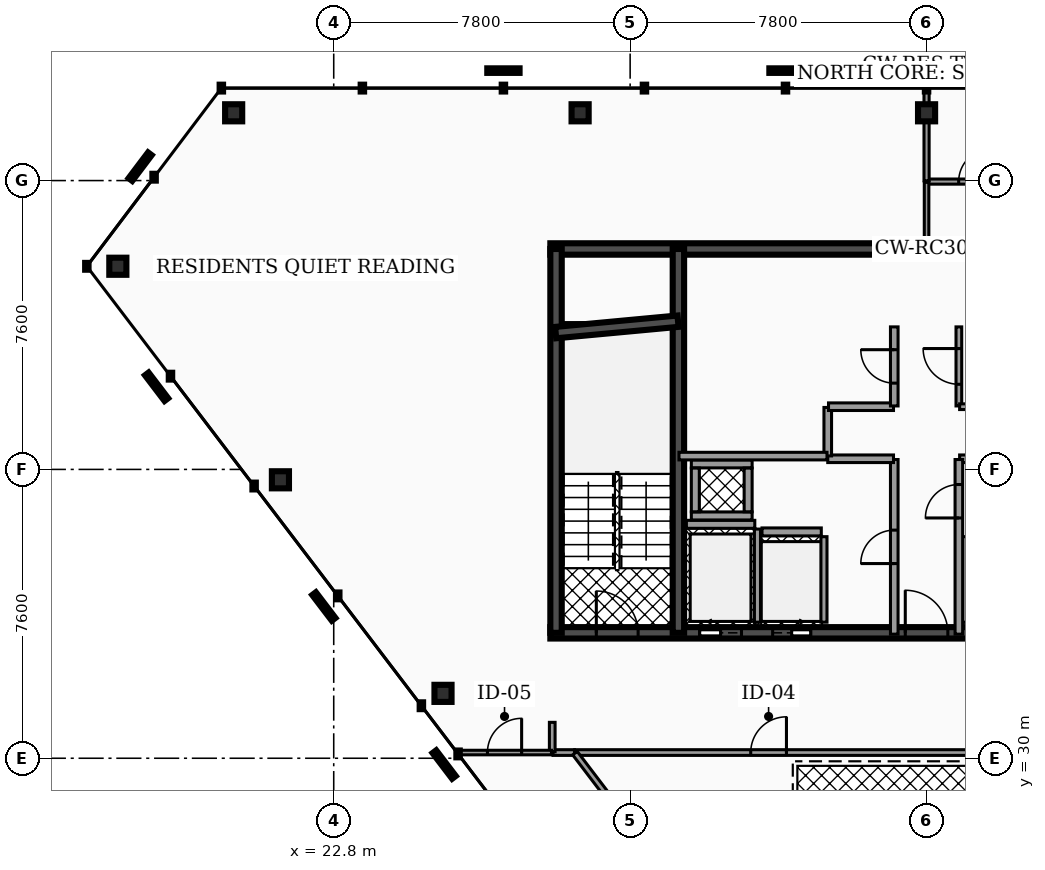
"""IFC4 building model, lengths in metres.
Left out: names, types, materials, properties, quantities, classifications, styles, units other than length and angle.
Written with IfcOpenShell. Run it as: python <this file> out.ifc"""

import sys

from ifc_helpers import new_model, si_unit, direction, frame, frame_2d, origin, origin_2d, place, context, subcontext, project, spatial, rectangle, hollow_rectangle, extrude, element, fill, save


model = new_model("IFC4")
c1 = context("Model", 3, precision=1e-05, world=origin(), true_north=direction((0.0, 1.0)))
c2 = subcontext(c1, "Body", "Model", "MODEL_VIEW")
j1 = project(units=[si_unit("LENGTHUNIT", "METRE"), si_unit("PLANEANGLEUNIT", "RADIAN")], contexts=[c1])
p1 = place(None, origin())
s1 = spatial("IfcSite", under=j1, at=p1, CompositionType="ELEMENT")
p2 = place(p1, origin())
s2 = spatial("IfcBuilding", under=s1, at=p2, CompositionType="ELEMENT")
p3 = place(p2, frame((0.0, 0.0, 278.8)))
s3 = spatial("IfcBuildingStorey", under=s2, at=p3, CompositionType="ELEMENT", Elevation=278.8)
p4 = place(p3, frame((28.5, 43.4, 0.0), z_axis=(0.0, 0.0, 1.0), x_axis=(1.0, 0.0, 0.0)))
e1 = element("IfcWall", 1, at=p4, inside=s3, PredefinedType="SHEAR", context=c2, shape_type="SweptSolid", body=[
    extrude(rectangle(XDim=19.86, YDim=0.3, at=frame_2d((9.93, 0.0))), origin(), (0.0, 0.0, 1.0), 3.18),
])
p5 = place(p3, frame((28.5, 33.3, 0.0), z_axis=(0.0, 0.0, 1.0), x_axis=(1.0, 0.0, 0.0)))
e2 = element("IfcWall", 2, at=p5, inside=s3, PredefinedType="SHEAR", context=c2, shape_type="SweptSolid", body=[
    extrude(rectangle(XDim=19.86, YDim=0.3, at=frame_2d((9.93, 0.0))), origin(), (0.0, 0.0, 1.0), 3.18),
])
p6 = place(p5, frame((3.93, 0.0, 0.0)))
e3 = element("IfcOpeningElement", 3, at=p6, cuts=e2, PredefinedType="OPENING", context=c2, shape_type="SweptSolid", body=[
    extrude(rectangle(XDim=1.1, YDim=2.15, at=frame_2d((0.55, 1.075))), frame((0.0, 0.16, 0.0), z_axis=(0.0, -1.0, 0.0), x_axis=(1.0, 0.0, 0.0)), (0.0, 0.0, 1.0), 0.32),
])
p7 = place(p5, frame((14.77, 0.0, 0.0)))
e4 = element("IfcOpeningElement", 4, at=p7, cuts=e2, PredefinedType="OPENING", context=c2, shape_type="SweptSolid", body=[
    extrude(rectangle(XDim=1.1, YDim=2.15, at=frame_2d((0.55, 1.075))), frame((0.0, 0.16, 0.0), z_axis=(0.0, -1.0, 0.0), x_axis=(1.0, 0.0, 0.0)), (0.0, 0.0, 1.0), 0.32),
])
p8 = place(p5, frame((11.25, 0.0, 0.0)))
e5 = element("IfcOpeningElement", 5, at=p8, cuts=e2, PredefinedType="OPENING", context=c2, shape_type="SweptSolid", body=[
    extrude(rectangle(XDim=1.0, YDim=2.1, at=frame_2d((0.5, 1.05))), frame((0.0, 0.16, 0.0), z_axis=(0.0, -1.0, 0.0), x_axis=(1.0, 0.0, 0.0)), (0.0, 0.0, 1.0), 0.32),
])
p9 = place(p5, frame((12.95, 0.0, 0.0)))
e6 = element("IfcOpeningElement", 6, at=p9, cuts=e2, PredefinedType="OPENING", context=c2, shape_type="SweptSolid", body=[
    extrude(rectangle(XDim=1.0, YDim=2.1, at=frame_2d((0.5, 1.05))), frame((0.0, 0.16, 0.0), z_axis=(0.0, -1.0, 0.0), x_axis=(1.0, 0.0, 0.0)), (0.0, 0.0, 1.0), 0.32),
])
p10 = place(p5, frame((5.85, 0.0, 0.0)))
e7 = element("IfcOpeningElement", 7, at=p10, cuts=e2, PredefinedType="OPENING", context=c2, shape_type="SweptSolid", body=[
    extrude(rectangle(XDim=1.0, YDim=2.1, at=frame_2d((0.5, 1.05))), frame((0.0, 0.16, 0.0), z_axis=(0.0, -1.0, 0.0), x_axis=(1.0, 0.0, 0.0)), (0.0, 0.0, 1.0), 0.32),
])
p11 = place(p5, frame((1.21, 0.0, 0.0)))
e8 = element("IfcOpeningElement", 8, at=p11, cuts=e2, PredefinedType="OPENING", context=c2, shape_type="SweptSolid", body=[
    extrude(rectangle(XDim=1.1, YDim=2.2, at=frame_2d((0.55, 1.1))), frame((0.0, 0.16, 0.0), z_axis=(0.0, -1.0, 0.0), x_axis=(1.0, 0.0, 0.0)), (0.0, 0.0, 1.0), 0.32),
])
p12 = place(p5, frame((9.34, 0.0, 0.0)))
e9 = element("IfcOpeningElement", 9, at=p12, cuts=e2, PredefinedType="OPENING", context=c2, shape_type="SweptSolid", body=[
    extrude(rectangle(XDim=1.12, YDim=2.05, at=frame_2d((0.56, 1.025))), frame((0.0, 0.16, 0.0), z_axis=(0.0, -1.0, 0.0), x_axis=(1.0, 0.0, 0.0)), (0.0, 0.0, 1.0), 0.32),
])
p13 = place(p5, frame((17.55, 0.0, 0.0)))
e10 = element("IfcOpeningElement", 10, at=p13, cuts=e2, PredefinedType="OPENING", context=c2, shape_type="SweptSolid", body=[
    extrude(rectangle(XDim=1.1, YDim=2.2, at=frame_2d((0.55, 1.1))), frame((0.0, 0.16, 0.0), z_axis=(0.0, -1.0, 0.0), x_axis=(1.0, 0.0, 0.0)), (0.0, 0.0, 1.0), 0.32),
])
for number, where, z_axis, x_axis in (
    (11, (28.65, 33.3, 0.0), (0.0, 0.0, 1.0), (0.0, 1.0, 0.0)),
    (12, (31.87, 33.3, 0.0), (0.0, 0.0, 1.0), (0.0, 1.0, 0.0)),
):
    element("IfcWall", number, at=place(p3, frame(where, z_axis=z_axis, x_axis=x_axis)), inside=s3, PredefinedType="SHEAR", context=c2, shape_type="SweptSolid", body=[
        extrude(rectangle(XDim=10.1, YDim=0.3, at=frame_2d((5.05, 0.0))), origin(), (0.0, 0.0, 1.0), 3.18),
    ])
p14 = place(p3, frame((28.64, 41.2, 0.0), z_axis=(0.0, 0.0, 1.0), x_axis=(0.995687118776, 0.092774789157, 0.0)))
e13 = element("IfcWall", 13, at=p14, inside=s3, PredefinedType="SHEAR", context=c2, shape_type="SweptSolid", body=[
    extrude(rectangle(XDim=3.234, YDim=0.3, at=frame_2d((1.617, 0.0))), origin(), (0.0, 0.0, 1.0), 3.18),
])
for number, where, z_axis, x_axis in (
    (14, (38.4, 46.983, 0.0), (0.0, 0.0, 1.0), (1.0, 0.0, 0.0)),
    (15, (29.283, 46.983, 0.0), (0.0, 0.0, 1.0), (1.0, 0.0, 0.0)),
    (16, (20.167, 46.983, 0.0), (0.0, 0.0, 1.0), (1.0, 0.0, 0.0)),
    (17, (17.119, 42.946, 0.0), (0.0, 0.0, 1.0), (1.0, 0.0, 0.0)),
    (18, (21.397, 37.327, 0.0), (0.0, 0.0, 1.0), (1.0, 0.0, 0.0)),
    (19, (25.676, 31.708, 0.0), (0.0, 0.0, 1.0), (1.0, 0.0, 0.0)),
):
    element("IfcColumn", number, at=place(p3, frame(where, z_axis=z_axis, x_axis=x_axis)), inside=s3, PredefinedType="COLUMN", context=c2, shape_type="SweptSolid", body=[
        extrude(hollow_rectangle(XDim=0.45, YDim=0.45, WallThickness=0.022, at=origin_2d()), origin(), (0.0, 0.0, 1.0), 3.18),
    ])
p15 = place(p3, frame((32.08, 36.155, 0.0), z_axis=(0.0, 0.0, 1.0), x_axis=(1.0, 0.0, 0.0)))
e20 = element("IfcWall", 20, at=p15, inside=s3, PredefinedType="SOLIDWALL", context=c2, shape_type="SweptSolid", body=[
    extrude(rectangle(XDim=1.8, YDim=0.21, at=frame_2d((0.9, 0.0))), origin(), (0.0, 0.0, 1.0), 3.18),
])
p16 = place(p3, frame((33.95, 33.58, 0.0), z_axis=(0.0, 0.0, 1.0), x_axis=(0.0, 1.0, 0.0)))
e21 = element("IfcWall", 21, at=p16, inside=s3, PredefinedType="SOLIDWALL", context=c2, shape_type="SweptSolid", body=[
    extrude(rectangle(XDim=2.45, YDim=0.16, at=frame_2d((1.225, 0.0))), origin(), (0.0, 0.0, 1.0), 3.18),
])
p17 = place(p3, frame((39.4, 33.58, 0.0), z_axis=(0.0, 0.0, 1.0), x_axis=(0.0, 1.0, 0.0)))
e22 = element("IfcWall", 22, at=p17, inside=s3, PredefinedType="SOLIDWALL", context=c2, shape_type="SweptSolid", body=[
    extrude(rectangle(XDim=2.25, YDim=0.16, at=frame_2d((1.125, 0.0))), origin(), (0.0, 0.0, 1.0), 3.18),
])
p18 = place(p3, frame((34.07, 35.955, 0.0), z_axis=(0.0, 0.0, 1.0), x_axis=(1.0, 0.0, 0.0)))
e23 = element("IfcWall", 23, at=p18, inside=s3, PredefinedType="SOLIDWALL", context=c2, shape_type="SweptSolid", body=[
    extrude(rectangle(XDim=1.56, YDim=0.21, at=frame_2d((0.78, 0.0))), origin(), (0.0, 0.0, 1.0), 3.18),
])
p19 = place(p3, frame((35.7, 33.58, 0.0), z_axis=(0.0, 0.0, 1.0), x_axis=(0.0, 1.0, 0.0)))
e24 = element("IfcWall", 24, at=p19, inside=s3, PredefinedType="SOLIDWALL", context=c2, shape_type="SweptSolid", body=[
    extrude(rectangle(XDim=2.25, YDim=0.16, at=frame_2d((1.125, 0.0))), origin(), (0.0, 0.0, 1.0), 3.18),
])
for number, where, z_axis, x_axis in (
    (25, (32.21, 36.375, 0.0), (0.0, 0.0, 1.0), (1.0, 0.0, 0.0)),
    (26, (32.21, 37.745, 0.0), (0.0, 0.0, 1.0), (1.0, 0.0, 0.0)),
):
    element("IfcWall", number, at=place(p3, frame(where, z_axis=z_axis, x_axis=x_axis)), inside=s3, PredefinedType="SOLIDWALL", context=c2, shape_type="SweptSolid", body=[
        extrude(rectangle(XDim=1.6, YDim=0.21, at=frame_2d((0.8, 0.0))), origin(), (0.0, 0.0, 1.0), 3.18),
    ])
for number, where, z_axis, x_axis in (
    (27, (32.315, 36.485, 0.0), (0.0, 0.0, 1.0), (0.0, 1.0, 0.0)),
    (28, (33.705, 36.485, 0.0), (0.0, 0.0, 1.0), (0.0, 1.0, 0.0)),
):
    element("IfcWall", number, at=place(p3, frame(where, z_axis=z_axis, x_axis=x_axis)), inside=s3, PredefinedType="SOLIDWALL", context=c2, shape_type="SweptSolid", body=[
        extrude(rectangle(XDim=1.15, YDim=0.21, at=frame_2d((0.575, 0.0))), origin(), (0.0, 0.0, 1.0), 3.18),
    ])
p20 = place(p3, frame((37.55, 33.265, 0.0), z_axis=(0.0, 0.0, 1.0), x_axis=(0.0, 1.0, 0.0)))
e29 = element("IfcWall", 29, at=p20, inside=s3, PredefinedType="PARTITIONING", context=c2, shape_type="SweptSolid", body=[
    extrude(rectangle(XDim=4.595, YDim=0.2, at=frame_2d((2.298, 0.0))), origin(), (0.0, 0.0, 1.0), 2.235),
])
p21 = place(p20, frame((1.857, 0.0, 0.0)))
e30 = element("IfcOpeningElement", 30, at=p21, cuts=e29, PredefinedType="OPENING", context=c2, shape_type="SweptSolid", body=[
    extrude(rectangle(XDim=0.88, YDim=2.05, at=frame_2d((0.44, 1.025))), frame((0.0, 0.11, 0.0), z_axis=(0.0, -1.0, 0.0), x_axis=(1.0, 0.0, 0.0)), (0.0, 0.0, 1.0), 0.22),
])
p22 = place(p3, frame((35.8, 37.88, 0.0), z_axis=(0.0, 0.0, 1.0), x_axis=(1.0, 0.0, 0.0)))
e31 = element("IfcWall", 31, at=p22, inside=s3, PredefinedType="PARTITIONING", context=c2, shape_type="SweptSolid", body=[
    extrude(rectangle(XDim=1.73, YDim=0.2, at=frame_2d((0.865, 0.0))), origin(), (0.0, 0.0, 1.0), 2.235),
])
p23 = place(p3, frame((35.8, 37.955, 0.0), z_axis=(0.0, 0.0, 1.0), x_axis=(0.0, 1.0, 0.0)))
e32 = element("IfcWall", 32, at=p23, inside=s3, PredefinedType="PARTITIONING", context=c2, shape_type="SweptSolid", body=[
    extrude(rectangle(XDim=1.275, YDim=0.2, at=frame_2d((0.637, 0.0))), origin(), (0.0, 0.0, 1.0), 2.235),
])
p24 = place(p3, frame((35.82, 39.25, 0.0), z_axis=(0.0, 0.0, 1.0), x_axis=(1.0, 0.0, 0.0)))
e33 = element("IfcWall", 33, at=p24, inside=s3, PredefinedType="PARTITIONING", context=c2, shape_type="SweptSolid", body=[
    extrude(rectangle(XDim=1.71, YDim=0.2, at=frame_2d((0.855, 0.0))), origin(), (0.0, 0.0, 1.0), 2.235),
])
p25 = place(p3, frame((37.55, 39.27, 0.0), z_axis=(0.0, 0.0, 1.0), x_axis=(0.0, 1.0, 0.0)))
e34 = element("IfcWall", 34, at=p25, inside=s3, PredefinedType="PARTITIONING", context=c2, shape_type="SweptSolid", body=[
    extrude(rectangle(XDim=2.08, YDim=0.2, at=frame_2d((1.04, 0.0))), origin(), (0.0, 0.0, 1.0), 2.235),
])
p26 = place(p25, frame((0.6, 0.0, 0.0)))
e35 = element("IfcOpeningElement", 35, at=p26, cuts=e34, PredefinedType="OPENING", context=c2, shape_type="SweptSolid", body=[
    extrude(rectangle(XDim=0.88, YDim=2.05, at=frame_2d((0.44, 1.025))), frame((0.0, 0.11, 0.0), z_axis=(0.0, -1.0, 0.0), x_axis=(1.0, 0.0, 0.0)), (0.0, 0.0, 1.0), 0.22),
])
p27 = place(p3, frame((39.27, 37.88, 0.0), z_axis=(0.0, 0.0, 1.0), x_axis=(1.0, 0.0, 0.0)))
e36 = element("IfcWall", 36, at=p27, inside=s3, PredefinedType="PARTITIONING", context=c2, shape_type="SweptSolid", body=[
    extrude(rectangle(XDim=1.93, YDim=0.2, at=frame_2d((0.965, 0.0))), origin(), (0.0, 0.0, 1.0), 2.235),
])
p28 = place(p3, frame((39.25, 33.265, 0.0), z_axis=(0.0, 0.0, 1.0), x_axis=(0.0, 1.0, 0.0)))
e37 = element("IfcWall", 37, at=p28, inside=s3, PredefinedType="PARTITIONING", context=c2, shape_type="SweptSolid", body=[
    extrude(rectangle(XDim=4.595, YDim=0.2, at=frame_2d((2.298, 0.0))), origin(), (0.0, 0.0, 1.0), 2.235),
])
p29 = place(p28, frame((3.058, 0.0, 0.0)))
e38 = element("IfcOpeningElement", 38, at=p29, cuts=e37, PredefinedType="OPENING", context=c2, shape_type="SweptSolid", body=[
    extrude(rectangle(XDim=0.88, YDim=2.05, at=frame_2d((0.44, 1.025))), frame((0.0, 0.11, 0.0), z_axis=(0.0, -1.0, 0.0), x_axis=(1.0, 0.0, 0.0)), (0.0, 0.0, 1.0), 0.22),
])
p30 = place(p3, frame((39.25, 39.27, 0.0), z_axis=(0.0, 0.0, 1.0), x_axis=(0.0, 1.0, 0.0)))
e39 = element("IfcWall", 39, at=p30, inside=s3, PredefinedType="PARTITIONING", context=c2, shape_type="SweptSolid", body=[
    extrude(rectangle(XDim=2.08, YDim=0.15, at=frame_2d((1.04, 0.0))), origin(), (0.0, 0.0, 1.0), 2.235),
])
p31 = place(p30, frame((0.57, 0.0, 0.0)))
e40 = element("IfcOpeningElement", 40, at=p31, cuts=e39, PredefinedType="OPENING", context=c2, shape_type="SweptSolid", body=[
    extrude(rectangle(XDim=0.94, YDim=2.05, at=frame_2d((0.47, 1.025))), frame((0.0, 0.085, 0.0), z_axis=(0.0, -1.0, 0.0), x_axis=(1.0, 0.0, 0.0)), (0.0, 0.0, 1.0), 0.17),
])
p32 = place(p3, frame((39.27, 39.25, 0.0), z_axis=(0.0, 0.0, 1.0), x_axis=(1.0, 0.0, 0.0)))
e41 = element("IfcWall", 41, at=p32, inside=s3, PredefinedType="PARTITIONING", context=c2, shape_type="SweptSolid", body=[
    extrude(rectangle(XDim=1.91, YDim=0.15, at=frame_2d((0.955, 0.0))), origin(), (0.0, 0.0, 1.0), 2.235),
])
p33 = place(p3, frame((31.885, 37.95, 0.0), z_axis=(0.0, 0.0, 1.0), x_axis=(1.0, 0.0, 0.0)))
e42 = element("IfcWall", 42, at=p33, inside=s3, PredefinedType="PARTITIONING", context=c2, shape_type="SweptSolid", body=[
    extrude(rectangle(XDim=3.895, YDim=0.2, at=frame_2d((1.948, 0.0))), origin(), (0.0, 0.0, 1.0), 2.235),
])
p34 = place(p3, frame((29.141, 30.15, 0.0), z_axis=(0.0, 0.0, 1.0), x_axis=(1.0, 0.0, 0.0)))
e43 = element("IfcWall", 43, at=p34, inside=s3, PredefinedType="PARTITIONING", context=c2, shape_type="SweptSolid", body=[
    extrude(rectangle(XDim=16.204, YDim=0.15, at=frame_2d((8.102, 0.0))), origin(), (0.0, 0.0, 1.0), 2.235),
])
p35 = place(p34, frame((4.632, 0.0, 0.0)))
e44 = element("IfcOpeningElement", 44, at=p35, cuts=e43, PredefinedType="OPENING", context=c2, shape_type="SweptSolid", body=[
    extrude(rectangle(XDim=0.94, YDim=2.05, at=frame_2d((0.47, 1.025))), frame((0.0, 0.085, 0.0), z_axis=(0.0, -1.0, 0.0), x_axis=(1.0, 0.0, 0.0)), (0.0, 0.0, 1.0), 0.17),
])
p36 = place(p3, frame((28.57, 30.15, 0.0), z_axis=(0.0, 0.0, 1.0), x_axis=(1.0, 0.0, 0.0)))
e45 = element("IfcWall", 45, at=p36, inside=s3, PredefinedType="PARTITIONING", context=c2, shape_type="SweptSolid", body=[
    extrude(rectangle(XDim=0.565, YDim=0.15, at=frame_2d((0.282, 0.0))), origin(), (0.0, 0.0, 1.0), 2.235),
])
p37 = place(p3, frame((28.55, 30.17, 0.0), z_axis=(0.0, 0.0, 1.0), x_axis=(0.0, 1.0, 0.0)))
e46 = element("IfcWall", 46, at=p37, inside=s3, PredefinedType="PARTITIONING", context=c2, shape_type="SweptSolid", body=[
    extrude(rectangle(XDim=0.775, YDim=0.15, at=frame_2d((0.387, 0.0))), origin(), (0.0, 0.0, 1.0), 2.235),
])
p38 = place(p3, frame((29.148, 30.134, 0.0), z_axis=(0.0, 0.0, 1.0), x_axis=(0.605873710815, -0.795560837739, 0.0)))
e47 = element("IfcWall", 47, at=p38, inside=s3, PredefinedType="PARTITIONING", context=c2, shape_type="SweptSolid", body=[
    extrude(rectangle(XDim=2.474, YDim=0.15, at=frame_2d((1.237, 0.0))), origin(), (0.0, 0.0, 1.0), 2.235),
])
p39 = place(p3, frame((26.059, 30.15, 0.0), z_axis=(0.0, 0.0, 1.0), x_axis=(1.0, 0.0, 0.0)))
e48 = element("IfcWall", 48, at=p39, inside=s3, PredefinedType="PARTITIONING", context=c2, shape_type="SweptSolid", body=[
    extrude(rectangle(XDim=2.471, YDim=0.12, at=frame_2d((1.235, 0.0))), origin(), (0.0, 0.0, 1.0), 2.235),
])
p40 = place(p39, frame((0.785, 0.0, 0.0)))
e49 = element("IfcOpeningElement", 49, at=p40, cuts=e48, PredefinedType="OPENING", context=c2, shape_type="SweptSolid", body=[
    extrude(rectangle(XDim=0.9, YDim=2.05, at=frame_2d((0.45, 1.025))), frame((0.0, 0.07, 0.0), z_axis=(0.0, -1.0, 0.0), x_axis=(1.0, 0.0, 0.0)), (0.0, 0.0, 1.0), 0.14),
])
p41 = place(p3, frame((38.42, 45.173, 0.0), z_axis=(0.0, 0.0, 1.0), x_axis=(1.0, 0.0, 0.0)))
e50 = element("IfcWall", 50, at=p41, inside=s3, PredefinedType="PARTITIONING", context=c2, shape_type="SweptSolid", body=[
    extrude(rectangle(XDim=2.51, YDim=0.135, at=frame_2d((1.255, 0.0))), origin(), (0.0, 0.0, 1.0), 2.235),
])
p42 = place(p41, frame((0.825, 0.0, 0.0)))
e51 = element("IfcOpeningElement", 51, at=p42, cuts=e50, PredefinedType="OPENING", context=c2, shape_type="SweptSolid", body=[
    extrude(rectangle(XDim=0.86, YDim=2.05, at=frame_2d((0.43, 1.025))), frame((0.0, 0.077, 0.0), z_axis=(0.0, -1.0, 0.0), x_axis=(1.0, 0.0, 0.0)), (0.0, 0.0, 1.0), 0.155),
])
p43 = place(p3, frame((38.4, 43.415, 0.0), z_axis=(0.0, 0.0, 1.0), x_axis=(0.0, 1.0, 0.0)))
e52 = element("IfcWall", 52, at=p43, inside=s3, PredefinedType="PARTITIONING", context=c2, shape_type="SweptSolid", body=[
    extrude(rectangle(XDim=1.738, YDim=0.12, at=frame_2d((0.869, 0.0))), origin(), (0.0, 0.0, 1.0), 2.235),
])
p44 = place(p3, frame((38.4, 45.193, 0.0), z_axis=(0.0, 0.0, 1.0), x_axis=(0.0, 1.0, 0.0)))
e53 = element("IfcWall", 53, at=p44, inside=s3, PredefinedType="PARTITIONING", context=c2, shape_type="SweptSolid", body=[
    extrude(rectangle(XDim=2.425, YDim=0.135, at=frame_2d((1.212, 0.0))), origin(), (0.0, 0.0, 1.0), 2.235),
])
p45 = place(p6, origin())
e54 = element("IfcDoor", 54, at=p45, inside=s3, OperationType="SLIDING_TO_LEFT", PredefinedType="DOOR", context=c2, shape_type="SweptSolid", body=[
    extrude(rectangle(XDim=1.1, YDim=2.15, at=frame_2d((0.55, 1.075))), frame((0.0, 0.025, 0.0), z_axis=(0.0, -1.0, 0.0), x_axis=(1.0, 0.0, 0.0)), (0.0, 0.0, 1.0), 0.05),
])
fill(e3, e54)
p46 = place(p10, origin())
e55 = element("IfcDoor", 55, at=p46, inside=s3, OperationType="SLIDING_TO_RIGHT", PredefinedType="DOOR", context=c2, shape_type="SweptSolid", body=[
    extrude(rectangle(XDim=1.0, YDim=2.1, at=frame_2d((0.5, 1.05))), frame((0.0, 0.025, 0.0), z_axis=(0.0, -1.0, 0.0), x_axis=(1.0, 0.0, 0.0)), (0.0, 0.0, 1.0), 0.05),
])
fill(e7, e55)
p47 = place(p11, origin())
e56 = element("IfcDoor", 56, at=p47, inside=s3, OperationType="SINGLE_SWING_LEFT", PredefinedType="DOOR", context=c2, shape_type="SweptSolid", body=[
    extrude(rectangle(XDim=1.1, YDim=2.2, at=frame_2d((0.55, 1.1))), frame((0.0, 0.025, 0.0), z_axis=(0.0, -1.0, 0.0), x_axis=(1.0, 0.0, 0.0)), (0.0, 0.0, 1.0), 0.05),
])
fill(e8, e56)
p48 = place(p12, origin())
e57 = element("IfcDoor", 57, at=p48, inside=s3, OperationType="SINGLE_SWING_LEFT", PredefinedType="DOOR", context=c2, shape_type="SweptSolid", body=[
    extrude(rectangle(XDim=1.12, YDim=2.05, at=frame_2d((0.56, 1.025))), frame((0.0, 0.025, 0.0), z_axis=(0.0, -1.0, 0.0), x_axis=(1.0, 0.0, 0.0)), (0.0, 0.0, 1.0), 0.05),
])
fill(e9, e57)
p49 = place(p21, origin())
e58 = element("IfcDoor", 58, at=p49, inside=s3, OperationType="SINGLE_SWING_LEFT", PredefinedType="DOOR", context=c2, shape_type="SweptSolid", body=[
    extrude(rectangle(XDim=0.88, YDim=2.05, at=frame_2d((0.44, 1.025))), frame((0.0, 0.025, 0.0), z_axis=(0.0, -1.0, 0.0), x_axis=(1.0, 0.0, 0.0)), (0.0, 0.0, 1.0), 0.05),
])
fill(e30, e58)
p50 = place(p26, origin())
e59 = element("IfcDoor", 59, at=p50, inside=s3, OperationType="SINGLE_SWING_RIGHT", PredefinedType="DOOR", context=c2, shape_type="SweptSolid", body=[
    extrude(rectangle(XDim=0.88, YDim=2.05, at=frame_2d((0.44, 1.025))), frame((0.0, 0.025, 0.0), z_axis=(0.0, -1.0, 0.0), x_axis=(1.0, 0.0, 0.0)), (0.0, 0.0, 1.0), 0.05),
])
fill(e35, e59)
p51 = place(p29, origin())
e60 = element("IfcDoor", 60, at=p51, inside=s3, OperationType="SINGLE_SWING_LEFT", PredefinedType="DOOR", context=c2, shape_type="SweptSolid", body=[
    extrude(rectangle(XDim=0.88, YDim=2.05, at=frame_2d((0.44, 1.025))), frame((0.0, 0.025, 0.0), z_axis=(0.0, -1.0, 0.0), x_axis=(1.0, 0.0, 0.0)), (0.0, 0.0, 1.0), 0.05),
])
fill(e38, e60)
p52 = place(p31, origin())
e61 = element("IfcDoor", 61, at=p52, inside=s3, OperationType="SINGLE_SWING_RIGHT", PredefinedType="DOOR", context=c2, shape_type="SweptSolid", body=[
    extrude(rectangle(XDim=0.94, YDim=2.05, at=frame_2d((0.47, 1.025))), frame((0.0, 0.025, 0.0), z_axis=(0.0, -1.0, 0.0), x_axis=(1.0, 0.0, 0.0)), (0.0, 0.0, 1.0), 0.05),
])
fill(e40, e61)
p53 = place(p35, origin())
e62 = element("IfcDoor", 62, at=p53, inside=s3, OperationType="SINGLE_SWING_RIGHT", PredefinedType="DOOR", context=c2, shape_type="SweptSolid", body=[
    extrude(rectangle(XDim=0.94, YDim=2.05, at=frame_2d((0.47, 1.025))), frame((0.0, 0.025, 0.0), z_axis=(0.0, -1.0, 0.0), x_axis=(1.0, 0.0, 0.0)), (0.0, 0.0, 1.0), 0.05),
])
fill(e44, e62)
p54 = place(p40, origin())
e63 = element("IfcDoor", 63, at=p54, inside=s3, OperationType="SINGLE_SWING_RIGHT", PredefinedType="DOOR", context=c2, shape_type="SweptSolid", body=[
    extrude(rectangle(XDim=0.9, YDim=2.05, at=frame_2d((0.45, 1.025))), frame((0.0, 0.025, 0.0), z_axis=(0.0, -1.0, 0.0), x_axis=(1.0, 0.0, 0.0)), (0.0, 0.0, 1.0), 0.05),
])
fill(e49, e63)
p55 = place(p42, origin())
e64 = element("IfcDoor", 64, at=p55, inside=s3, OperationType="SINGLE_SWING_RIGHT", PredefinedType="DOOR", context=c2, shape_type="SweptSolid", body=[
    extrude(rectangle(XDim=0.86, YDim=2.05, at=frame_2d((0.43, 1.025))), frame((0.0, 0.025, 0.0), z_axis=(0.0, -1.0, 0.0), x_axis=(1.0, 0.0, 0.0)), (0.0, 0.0, 1.0), 0.05),
])
fill(e51, e64)
save(model, sys.argv[1])
